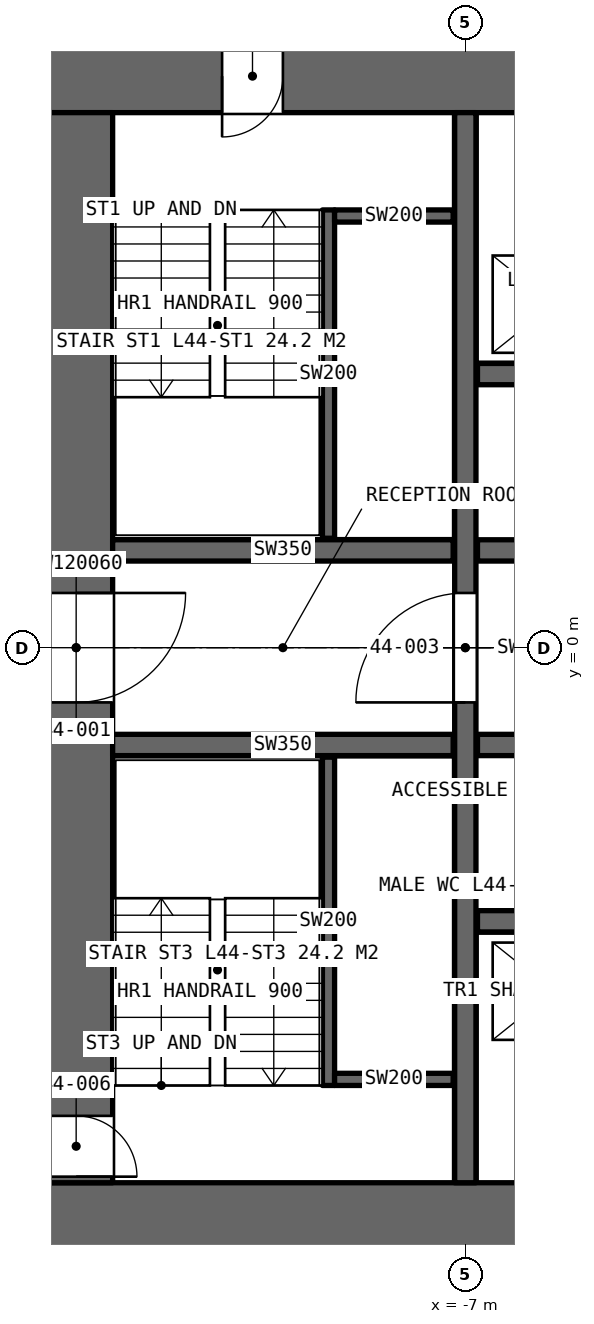
"""IFC4 building model, lengths in metres.
Left out: names, types, materials, properties, quantities, classifications, styles, units other than length and angle.
Written with IfcOpenShell. Run it as: python <this file> out.ifc"""

import sys

from ifc_helpers import new_model, si_unit, direction, frame, frame_2d, origin, place, context, subcontext, project, spatial, rectangle, extrude, element, fill, save


model = new_model("IFC4")
c1 = context("Model", 3, precision=1e-05, world=origin(), true_north=direction((0.0, 1.0)))
c2 = subcontext(c1, "Body", "Model", "MODEL_VIEW")
j1 = project(units=[si_unit("LENGTHUNIT", "METRE"), si_unit("PLANEANGLEUNIT", "RADIAN")], contexts=[c1])
p1 = place(None, origin())
s1 = spatial("IfcSite", under=j1, at=p1, CompositionType="ELEMENT")
p2 = place(p1, origin())
s2 = spatial("IfcBuilding", under=s1, at=p2, CompositionType="ELEMENT")
p3 = place(p2, frame((0.0, 0.0, 203.2)))
s3 = spatial("IfcBuildingStorey", under=s2, at=p3, CompositionType="ELEMENT", Elevation=203.2)
p4 = place(p3, frame((-14.0, -9.4, 0.0), z_axis=(0.0, 0.0, 1.0), x_axis=(1.0, 0.0, 0.0)))
e1 = element("IfcWall", 1, at=p4, inside=s3, PredefinedType="SHEAR", context=c2, shape_type="SweptSolid", body=[
    extrude(rectangle(XDim=28.0, YDim=1.2, at=frame_2d((14.0, 0.0))), origin(), (0.0, 0.0, 1.0), 4.2),
])
p5 = place(p4, frame((22.9, 0.0, 0.0)))
e2 = element("IfcOpeningElement", 2, at=p5, cuts=e1, PredefinedType="OPENING", context=c2, shape_type="SweptSolid", body=[
    extrude(rectangle(XDim=2.2, YDim=2.7, at=frame_2d((1.1, 1.35))), frame((0.0, 0.61, 0.0), z_axis=(0.0, -1.0, 0.0), x_axis=(1.0, 0.0, 0.0)), (0.0, 0.0, 1.0), 1.22),
])
p6 = place(p3, frame((14.0, 9.4, 0.0), z_axis=(0.0, 0.0, 1.0), x_axis=(-1.0, 0.0, 0.0)))
e3 = element("IfcWall", 3, at=p6, inside=s3, PredefinedType="SHEAR", context=c2, shape_type="SweptSolid", body=[
    extrude(rectangle(XDim=28.0, YDim=1.2, at=frame_2d((14.0, 0.0))), origin(), (0.0, 0.0, 1.0), 4.2),
])
p7 = place(p6, frame((24.0, 0.0, 0.0)))
e4 = element("IfcOpeningElement", 4, at=p7, cuts=e3, PredefinedType="OPENING", context=c2, shape_type="SweptSolid", body=[
    extrude(rectangle(XDim=1.0, YDim=2.4, at=frame_2d((0.5, 1.2))), frame((0.0, 0.61, 0.0), z_axis=(0.0, -1.0, 0.0), x_axis=(1.0, 0.0, 0.0)), (0.0, 0.0, 1.0), 1.22),
])
p8 = place(p3, frame((-13.4, 8.8, 0.0), z_axis=(0.0, 0.0, 1.0), x_axis=(0.0, -1.0, 0.0)))
e5 = element("IfcWall", 5, at=p8, inside=s3, PredefinedType="SHEAR", context=c2, shape_type="SweptSolid", body=[
    extrude(rectangle(XDim=17.6, YDim=1.2, at=frame_2d((8.8, 0.0))), origin(), (0.0, 0.0, 1.0), 4.2),
])
p9 = place(p8, frame((7.9, 0.0, 0.0)))
e6 = element("IfcOpeningElement", 6, at=p9, cuts=e5, PredefinedType="OPENING", context=c2, shape_type="SweptSolid", body=[
    extrude(rectangle(XDim=1.8, YDim=2.4, at=frame_2d((0.9, 1.2))), frame((0.0, 0.61, 0.0), z_axis=(0.0, -1.0, 0.0), x_axis=(1.0, 0.0, 0.0)), (0.0, 0.0, 1.0), 1.22),
])
p10 = place(p8, frame((16.5, 0.0, 0.0)))
e7 = element("IfcOpeningElement", 7, at=p10, cuts=e5, PredefinedType="OPENING", context=c2, shape_type="SweptSolid", body=[
    extrude(rectangle(XDim=1.0, YDim=2.4, at=frame_2d((0.5, 1.2))), frame((0.0, 0.61, 0.0), z_axis=(0.0, -1.0, 0.0), x_axis=(1.0, 0.0, 0.0)), (0.0, 0.0, 1.0), 1.22),
])
p11 = place(p3, frame((-7.0, -8.8, 0.0), z_axis=(0.0, 0.0, 1.0), x_axis=(0.0, 1.0, 0.0)))
e8 = element("IfcWall", 8, at=p11, inside=s3, PredefinedType="SHEAR", context=c2, shape_type="SweptSolid", body=[
    extrude(rectangle(XDim=17.6, YDim=0.35, at=frame_2d((8.8, 0.0))), origin(), (0.0, 0.0, 1.0), 4.2),
])
p12 = place(p11, frame((7.9, 0.0, 0.0)))
e9 = element("IfcOpeningElement", 9, at=p12, cuts=e8, PredefinedType="OPENING", context=c2, shape_type="SweptSolid", body=[
    extrude(rectangle(XDim=1.8, YDim=2.4, at=frame_2d((0.9, 1.2))), frame((0.0, 0.185, 0.0), z_axis=(0.0, -1.0, 0.0), x_axis=(1.0, 0.0, 0.0)), (0.0, 0.0, 1.0), 0.37),
])
p13 = place(p3, frame((-6.8, 1.6, 0.0), z_axis=(0.0, 0.0, 1.0), x_axis=(1.0, 0.0, 0.0)))
e10 = element("IfcWall", 10, at=p13, inside=s3, PredefinedType="SHEAR", context=c2, shape_type="SweptSolid", body=[
    extrude(rectangle(XDim=13.6, YDim=0.35, at=frame_2d((6.8, 0.0))), origin(), (0.0, 0.0, 1.0), 4.2),
])
p14 = place(p13, frame((11.95, 0.0, 0.0)))
e11 = element("IfcOpeningElement", 11, at=p14, cuts=e10, PredefinedType="OPENING", context=c2, shape_type="SweptSolid", body=[
    extrude(rectangle(XDim=0.9, YDim=2.4, at=frame_2d((0.45, 1.2))), frame((0.0, 0.185, 0.0), z_axis=(0.0, -1.0, 0.0), x_axis=(1.0, 0.0, 0.0)), (0.0, 0.0, 1.0), 0.37),
])
p15 = place(p13, frame((4.5, 0.0, 0.0)))
e12 = element("IfcOpeningElement", 12, at=p15, cuts=e10, PredefinedType="OPENING", context=c2, shape_type="SweptSolid", body=[
    extrude(rectangle(XDim=1.8, YDim=2.4, at=frame_2d((0.9, 1.2))), frame((0.0, 0.185, 0.0), z_axis=(0.0, -1.0, 0.0), x_axis=(1.0, 0.0, 0.0)), (0.0, 0.0, 1.0), 0.37),
])
p16 = place(p3, frame((-6.8, -1.6, 0.0), z_axis=(0.0, 0.0, 1.0), x_axis=(1.0, 0.0, 0.0)))
e13 = element("IfcWall", 13, at=p16, inside=s3, PredefinedType="SHEAR", context=c2, shape_type="SweptSolid", body=[
    extrude(rectangle(XDim=13.6, YDim=0.35, at=frame_2d((6.8, 0.0))), origin(), (0.0, 0.0, 1.0), 4.2),
])
p17 = place(p16, frame((0.715, 0.0, 0.0)))
e14 = element("IfcOpeningElement", 14, at=p17, cuts=e13, PredefinedType="OPENING", context=c2, shape_type="SweptSolid", body=[
    extrude(rectangle(XDim=1.1, YDim=2.4, at=frame_2d((0.55, 1.2))), frame((0.0, 0.185, 0.0), z_axis=(0.0, -1.0, 0.0), x_axis=(1.0, 0.0, 0.0)), (0.0, 0.0, 1.0), 0.37),
])
p18 = place(p16, frame((5.0, 0.0, 0.0)))
e15 = element("IfcOpeningElement", 15, at=p18, cuts=e13, PredefinedType="OPENING", context=c2, shape_type="SweptSolid", body=[
    extrude(rectangle(XDim=1.0, YDim=2.4, at=frame_2d((0.5, 1.2))), frame((0.0, 0.185, 0.0), z_axis=(0.0, -1.0, 0.0), x_axis=(1.0, 0.0, 0.0)), (0.0, 0.0, 1.0), 0.37),
])
p19 = place(p16, frame((9.135, 0.0, 0.0)))
e16 = element("IfcOpeningElement", 16, at=p19, cuts=e13, PredefinedType="OPENING", context=c2, shape_type="SweptSolid", body=[
    extrude(rectangle(XDim=1.0, YDim=2.4, at=frame_2d((0.5, 1.2))), frame((0.0, 0.185, 0.0), z_axis=(0.0, -1.0, 0.0), x_axis=(1.0, 0.0, 0.0)), (0.0, 0.0, 1.0), 0.37),
])
p20 = place(p16, frame((11.9, 0.0, 0.0)))
e17 = element("IfcOpeningElement", 17, at=p20, cuts=e13, PredefinedType="OPENING", context=c2, shape_type="SweptSolid", body=[
    extrude(rectangle(XDim=1.0, YDim=2.4, at=frame_2d((0.5, 1.2))), frame((0.0, 0.185, 0.0), z_axis=(0.0, -1.0, 0.0), x_axis=(1.0, 0.0, 0.0)), (0.0, 0.0, 1.0), 0.37),
])
p21 = place(p3, frame((-6.8, 4.5, 0.0), z_axis=(0.0, 0.0, 1.0), x_axis=(1.0, 0.0, 0.0)))
e18 = element("IfcWall", 18, at=p21, inside=s3, PredefinedType="SHEAR", context=c2, shape_type="SweptSolid", body=[
    extrude(rectangle(XDim=13.6, YDim=0.35, at=frame_2d((6.8, 0.0))), origin(), (0.0, 0.0, 1.0), 4.2),
])
p22 = place(p21, frame((0.7, 0.0, 0.0)))
e19 = element("IfcOpeningElement", 19, at=p22, cuts=e18, PredefinedType="OPENING", context=c2, shape_type="SweptSolid", body=[
    extrude(rectangle(XDim=1.1, YDim=2.4, at=frame_2d((0.55, 1.2))), frame((0.0, 0.185, 0.0), z_axis=(0.0, -1.0, 0.0), x_axis=(1.0, 0.0, 0.0)), (0.0, 0.0, 1.0), 0.37),
])
p23 = place(p21, frame((3.5, 0.0, 0.0)))
e20 = element("IfcOpeningElement", 20, at=p23, cuts=e18, PredefinedType="OPENING", context=c2, shape_type="SweptSolid", body=[
    extrude(rectangle(XDim=1.1, YDim=2.4, at=frame_2d((0.55, 1.2))), frame((0.0, 0.185, 0.0), z_axis=(0.0, -1.0, 0.0), x_axis=(1.0, 0.0, 0.0)), (0.0, 0.0, 1.0), 0.37),
])
p24 = place(p21, frame((6.3, 0.0, 0.0)))
e21 = element("IfcOpeningElement", 21, at=p24, cuts=e18, PredefinedType="OPENING", context=c2, shape_type="SweptSolid", body=[
    extrude(rectangle(XDim=1.1, YDim=2.4, at=frame_2d((0.55, 1.2))), frame((0.0, 0.185, 0.0), z_axis=(0.0, -1.0, 0.0), x_axis=(1.0, 0.0, 0.0)), (0.0, 0.0, 1.0), 0.37),
])
p25 = place(p21, frame((9.1, 0.0, 0.0)))
e22 = element("IfcOpeningElement", 22, at=p25, cuts=e18, PredefinedType="OPENING", context=c2, shape_type="SweptSolid", body=[
    extrude(rectangle(XDim=1.1, YDim=2.4, at=frame_2d((0.55, 1.2))), frame((0.0, 0.185, 0.0), z_axis=(0.0, -1.0, 0.0), x_axis=(1.0, 0.0, 0.0)), (0.0, 0.0, 1.0), 0.37),
])
p26 = place(p3, frame((-6.8, -4.5, 0.0), z_axis=(0.0, 0.0, 1.0), x_axis=(1.0, 0.0, 0.0)))
e23 = element("IfcWall", 23, at=p26, inside=s3, PredefinedType="SHEAR", context=c2, shape_type="SweptSolid", body=[
    extrude(rectangle(XDim=13.6, YDim=0.35, at=frame_2d((6.8, 0.0))), origin(), (0.0, 0.0, 1.0), 4.2),
])
for number, where, z_axis, x_axis in (
    (24, (-12.8, 1.6, 0.0), (0.0, 0.0, 1.0), (1.0, 0.0, 0.0)),
    (25, (-12.8, -1.6, 0.0), (0.0, 0.0, 1.0), (1.0, 0.0, 0.0)),
):
    element("IfcWall", number, at=place(p3, frame(where, z_axis=z_axis, x_axis=x_axis)), inside=s3, PredefinedType="SHEAR", context=c2, shape_type="SweptSolid", body=[
        extrude(rectangle(XDim=5.6, YDim=0.35, at=frame_2d((2.8, 0.0))), origin(), (0.0, 0.0, 1.0), 4.2),
    ])
p27 = place(p3, frame((-9.25, 7.2, 0.0), z_axis=(0.0, 0.0, 1.0), x_axis=(0.0, -1.0, 0.0)))
e26 = element("IfcWall", 26, at=p27, inside=s3, PredefinedType="SOLIDWALL", context=c2, shape_type="SweptSolid", body=[
    extrude(rectangle(XDim=5.4, YDim=0.2, at=frame_2d((2.7, 0.0))), origin(), (0.0, 0.0, 1.0), 4.2),
])
p28 = place(p3, frame((-9.15, 7.1, 0.0), z_axis=(0.0, 0.0, 1.0), x_axis=(1.0, 0.0, 0.0)))
e27 = element("IfcWall", 27, at=p28, inside=s3, PredefinedType="SOLIDWALL", context=c2, shape_type="SweptSolid", body=[
    extrude(rectangle(XDim=1.95, YDim=0.2, at=frame_2d((0.975, 0.0))), origin(), (0.0, 0.0, 1.0), 4.2),
])
p29 = place(p3, frame((-9.25, -7.2, 0.0), z_axis=(0.0, 0.0, 1.0), x_axis=(0.0, 1.0, 0.0)))
e28 = element("IfcWall", 28, at=p29, inside=s3, PredefinedType="SOLIDWALL", context=c2, shape_type="SweptSolid", body=[
    extrude(rectangle(XDim=5.4, YDim=0.2, at=frame_2d((2.7, 0.0))), origin(), (0.0, 0.0, 1.0), 4.2),
])
p30 = place(p3, frame((-9.15, -7.1, 0.0), z_axis=(0.0, 0.0, 1.0), x_axis=(1.0, 0.0, 0.0)))
e29 = element("IfcWall", 29, at=p30, inside=s3, PredefinedType="SOLIDWALL", context=c2, shape_type="SweptSolid", body=[
    extrude(rectangle(XDim=1.95, YDim=0.2, at=frame_2d((0.975, 0.0))), origin(), (0.0, 0.0, 1.0), 4.2),
])
p31 = place(p9, origin())
e30 = element("IfcDoor", 30, at=p31, inside=s3, OperationType="DOUBLE_DOOR_SINGLE_SWING", PredefinedType="DOOR", context=c2, shape_type="SweptSolid", body=[
    extrude(rectangle(XDim=1.8, YDim=2.4, at=frame_2d((0.9, 1.2))), frame((0.0, 0.025, 0.0), z_axis=(0.0, -1.0, 0.0), x_axis=(1.0, 0.0, 0.0)), (0.0, 0.0, 1.0), 0.05),
])
fill(e6, e30)
p32 = place(p12, origin())
e31 = element("IfcDoor", 31, at=p32, inside=s3, OperationType="DOUBLE_DOOR_SINGLE_SWING", PredefinedType="DOOR", context=c2, shape_type="SweptSolid", body=[
    extrude(rectangle(XDim=1.8, YDim=2.4, at=frame_2d((0.9, 1.2))), frame((0.0, 0.025, 0.0), z_axis=(0.0, -1.0, 0.0), x_axis=(1.0, 0.0, 0.0)), (0.0, 0.0, 1.0), 0.05),
])
fill(e9, e31)
p33 = place(p7, origin())
e32 = element("IfcDoor", 32, at=p33, inside=s3, OperationType="SINGLE_SWING_RIGHT", PredefinedType="DOOR", context=c2, shape_type="SweptSolid", body=[
    extrude(rectangle(XDim=1.0, YDim=2.4, at=frame_2d((0.5, 1.2))), frame((0.0, 0.025, 0.0), z_axis=(0.0, -1.0, 0.0), x_axis=(1.0, 0.0, 0.0)), (0.0, 0.0, 1.0), 0.05),
])
fill(e4, e32)
p34 = place(p10, origin())
e33 = element("IfcDoor", 33, at=p34, inside=s3, OperationType="SINGLE_SWING_RIGHT", PredefinedType="DOOR", context=c2, shape_type="SweptSolid", body=[
    extrude(rectangle(XDim=1.0, YDim=2.4, at=frame_2d((0.5, 1.2))), frame((0.0, 0.025, 0.0), z_axis=(0.0, -1.0, 0.0), x_axis=(1.0, 0.0, 0.0)), (0.0, 0.0, 1.0), 0.05),
])
fill(e7, e33)
save(model, sys.argv[1])
